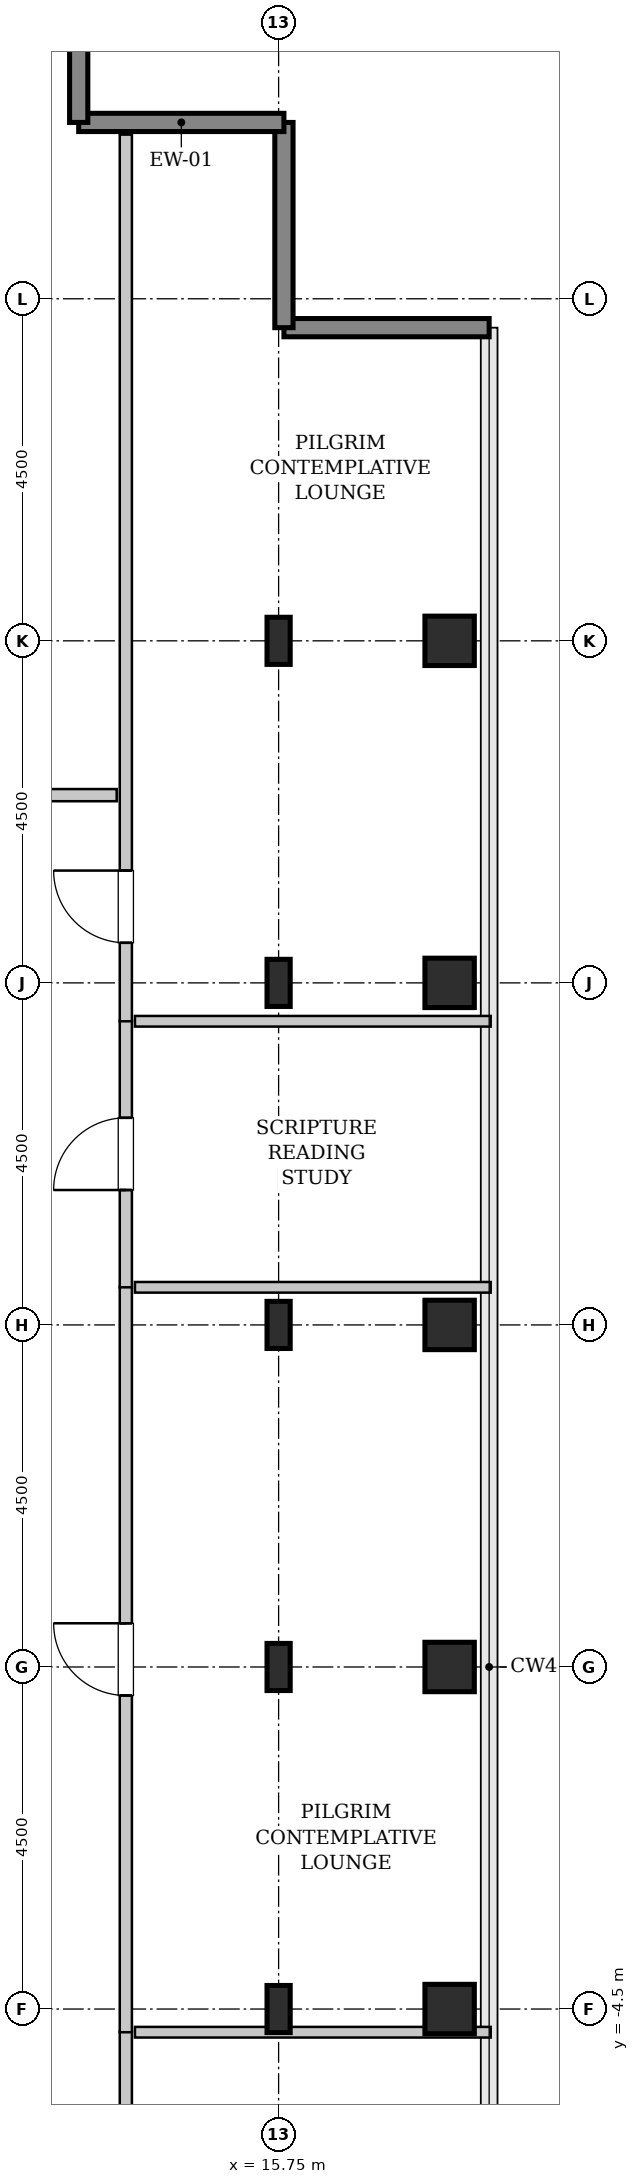
"""IFC4 building model, lengths in metres.
Left out: names, types, materials, properties, quantities, classifications, styles, units other than length and angle.
Written with IfcOpenShell. Run it as: python <this file> out.ifc"""

import sys

from ifc_helpers import new_model, si_unit, direction, frame, frame_2d, origin, origin_2d, place, context, subcontext, project, spatial, rectangle, hollow_rectangle, i_section, extrude, source, transform, mapped, element, fill, save


model = new_model("IFC4")
c1 = context("Model", 3, precision=1e-05, world=origin(), true_north=direction((0.0, 1.0)))
c2 = subcontext(c1, "Body", "Model", "MODEL_VIEW")
j1 = project(units=[si_unit("LENGTHUNIT", "METRE"), si_unit("PLANEANGLEUNIT", "RADIAN")], contexts=[c1])
p1 = place(None, origin())
s1 = spatial("IfcSite", under=j1, at=p1, CompositionType="ELEMENT")
p2 = place(p1, origin())
s2 = spatial("IfcBuilding", under=s1, at=p2, CompositionType="ELEMENT")
p3 = place(p2, frame((0.0, 0.0, 268.4)))
s3 = spatial("IfcBuildingStorey", under=s2, at=p3, CompositionType="ELEMENT", Elevation=268.4)
m1 = source(origin(), c2, "Body", "SweptSolid", [
    extrude(i_section(OverallWidth=0.305, OverallDepth=0.62, WebThickness=0.021, FlangeThickness=0.04, FilletRadius=0.027, at=origin_2d()), origin(), (0.0, 0.0, 1.0), 3.8),
])
for number, where, z_axis, x_axis in (
    (1, (15.75, -4.5, 0.0), (0.0, 0.0, 1.0), (1.0, 0.0, 0.0)),
    (2, (15.75, 0.0, 0.0), (0.0, 0.0, 1.0), (1.0, 0.0, 0.0)),
    (3, (15.75, 4.5, 0.0), (0.0, 0.0, 1.0), (1.0, 0.0, 0.0)),
    (4, (15.75, 9.0, 0.0), (0.0, 0.0, 1.0), (1.0, 0.0, 0.0)),
    (5, (15.75, 13.5, 0.0), (0.0, 0.0, 1.0), (1.0, 0.0, 0.0)),
):
    element("IfcColumn", number, at=place(p3, frame(where, z_axis=z_axis, x_axis=x_axis)), inside=s3, PredefinedType="COLUMN", context=c2, shape_type="MappedRepresentation", body=[
        mapped(m1, transform((0.0, 0.0, 0.0), x_axis=(1.0, 0.0, 0.0), y_axis=(0.0, 1.0, 0.0), z_axis=(0.0, 0.0, 1.0), scale=1.0)),
    ])
m2 = source(origin(), c2, "Body", "SweptSolid", [
    extrude(hollow_rectangle(XDim=0.65, YDim=0.65, WallThickness=0.032, InnerFilletRadius=0.032, OuterFilletRadius=0.064, at=origin_2d()), origin(), (0.0, 0.0, 1.0), 3.8),
])
for number, where, z_axis, x_axis in (
    (6, (18.0, -4.5, 0.0), (0.0, 0.0, 1.0), (1.0, 0.0, 0.0)),
    (7, (18.0, 0.0, 0.0), (0.0, 0.0, 1.0), (1.0, 0.0, 0.0)),
    (8, (18.0, 4.5, 0.0), (0.0, 0.0, 1.0), (1.0, 0.0, 0.0)),
    (9, (18.0, 9.0, 0.0), (0.0, 0.0, 1.0), (1.0, 0.0, 0.0)),
    (10, (18.0, 13.5, 0.0), (0.0, 0.0, 1.0), (1.0, 0.0, 0.0)),
):
    element("IfcColumn", number, at=place(p3, frame(where, z_axis=z_axis, x_axis=x_axis)), inside=s3, PredefinedType="COLUMN", context=c2, shape_type="MappedRepresentation", body=[
        mapped(m2, transform((0.0, 0.0, 0.0), x_axis=(1.0, 0.0, 0.0), y_axis=(0.0, 1.0, 0.0), z_axis=(0.0, 0.0, 1.0), scale=1.0)),
    ])
m3 = source(origin(), c2, "Body", "SweptSolid", [
    extrude(rectangle(XDim=2.7, YDim=0.24, at=frame_2d((1.35, 0.0))), origin(), (0.0, 0.0, 1.0), 3.55),
])
for number, where, z_axis, x_axis in (
    (11, (18.52, 17.62, 0.0), (0.0, 0.0, 1.0), (-1.0, 0.0, 0.0)),
    (12, (15.82, 17.62, 0.0), (0.0, 0.0, 1.0), (0.0, 1.0, 0.0)),
    (13, (15.82, 20.32, 0.0), (0.0, 0.0, 1.0), (-1.0, 0.0, 0.0)),
    (14, (13.12, 20.32, 0.0), (0.0, 0.0, 1.0), (0.0, 1.0, 0.0)),
):
    element("IfcWall", number, at=place(p3, frame(where, z_axis=z_axis, x_axis=x_axis)), inside=s3, PredefinedType="SHEAR", context=c2, shape_type="MappedRepresentation", body=[
        mapped(m3, transform((0.0, 0.0, 0.0), x_axis=(1.0, 0.0, 0.0), y_axis=(0.0, 1.0, 0.0), z_axis=(0.0, 0.0, 1.0), scale=1.0)),
    ])
m4 = source(origin(), c2, "Body", "SweptSolid", [
    extrude(rectangle(XDim=3.61, YDim=0.16, at=frame_2d((1.805, 0.0))), origin(), (0.0, 0.0, 1.0), 3.535),
])
p4 = place(p3, frame((13.74, -8.405, 0.0), z_axis=(0.0, 0.0, 1.0), x_axis=(0.0, 1.0, 0.0)))
e15 = element("IfcWall", 15, at=p4, inside=s3, PredefinedType="PARTITIONING", context=c2, shape_type="MappedRepresentation", body=[
    mapped(m4, transform((0.0, 0.0, 0.0), x_axis=(1.0, 0.0, 0.0), y_axis=(0.0, 1.0, 0.0), z_axis=(0.0, 0.0, 1.0), scale=1.0)),
])
p5 = place(p4, frame((1.33, 0.0, 0.0)))
e16 = element("IfcOpeningElement", 16, at=p5, cuts=e15, PredefinedType="OPENING", context=c2, shape_type="SweptSolid", body=[
    extrude(rectangle(XDim=0.95, YDim=2.1, at=frame_2d((0.475, 1.05))), frame((0.0, 0.09, 0.0), z_axis=(0.0, -1.0, 0.0), x_axis=(1.0, 0.0, 0.0)), (0.0, 0.0, 1.0), 0.18),
])
m5 = source(origin(), c2, "Body", "SweptSolid", [
    extrude(rectangle(XDim=4.68, YDim=0.14, at=frame_2d((2.34, 0.0))), origin(), (0.0, 0.0, 1.0), 2.925),
])
p6 = place(p3, frame((13.86, -4.805, 0.0), z_axis=(0.0, 0.0, 1.0), x_axis=(1.0, 0.0, 0.0)))
e17 = element("IfcWall", 17, at=p6, inside=s3, PredefinedType="PARTITIONING", context=c2, shape_type="MappedRepresentation", body=[
    mapped(m5, transform((0.0, 0.0, 0.0), x_axis=(1.0, 0.0, 0.0), y_axis=(0.0, 1.0, 0.0), z_axis=(0.0, 0.0, 1.0), scale=1.0)),
])
m6 = source(origin(), c2, "Body", "SweptSolid", [
    extrude(rectangle(XDim=9.81, YDim=0.16, at=frame_2d((4.905, 0.0))), origin(), (0.0, 0.0, 1.0), 3.535),
])
p7 = place(p3, frame((13.74, -4.805, 0.0), z_axis=(0.0, 0.0, 1.0), x_axis=(0.0, 1.0, 0.0)))
e18 = element("IfcWall", 18, at=p7, inside=s3, PredefinedType="PARTITIONING", context=c2, shape_type="MappedRepresentation", body=[
    mapped(m6, transform((0.0, 0.0, 0.0), x_axis=(1.0, 0.0, 0.0), y_axis=(0.0, 1.0, 0.0), z_axis=(0.0, 0.0, 1.0), scale=1.0)),
])
p8 = place(p7, frame((4.43, 0.0, 0.0)))
e19 = element("IfcOpeningElement", 19, at=p8, cuts=e18, PredefinedType="OPENING", context=c2, shape_type="SweptSolid", body=[
    extrude(rectangle(XDim=0.95, YDim=2.1, at=frame_2d((0.475, 1.05))), frame((0.0, 0.09, 0.0), z_axis=(0.0, -1.0, 0.0), x_axis=(1.0, 0.0, 0.0)), (0.0, 0.0, 1.0), 0.18),
])
p9 = place(p3, frame((13.86, 4.995, 0.0), z_axis=(0.0, 0.0, 1.0), x_axis=(1.0, 0.0, 0.0)))
e20 = element("IfcWall", 20, at=p9, inside=s3, PredefinedType="PARTITIONING", context=c2, shape_type="MappedRepresentation", body=[
    mapped(m5, transform((0.0, 0.0, 0.0), x_axis=(1.0, 0.0, 0.0), y_axis=(0.0, 1.0, 0.0), z_axis=(0.0, 0.0, 1.0), scale=1.0)),
])
m7 = source(origin(), c2, "Body", "SweptSolid", [
    extrude(rectangle(XDim=3.51, YDim=0.16, at=frame_2d((1.755, 0.0))), origin(), (0.0, 0.0, 1.0), 3.535),
])
p10 = place(p3, frame((13.74, 4.995, 0.0), z_axis=(0.0, 0.0, 1.0), x_axis=(0.0, 1.0, 0.0)))
e21 = element("IfcWall", 21, at=p10, inside=s3, PredefinedType="PARTITIONING", context=c2, shape_type="MappedRepresentation", body=[
    mapped(m7, transform((0.0, 0.0, 0.0), x_axis=(1.0, 0.0, 0.0), y_axis=(0.0, 1.0, 0.0), z_axis=(0.0, 0.0, 1.0), scale=1.0)),
])
p11 = place(p10, frame((1.28, 0.0, 0.0)))
e22 = element("IfcOpeningElement", 22, at=p11, cuts=e21, PredefinedType="OPENING", context=c2, shape_type="SweptSolid", body=[
    extrude(rectangle(XDim=0.95, YDim=2.1, at=frame_2d((0.475, 1.05))), frame((0.0, 0.09, 0.0), z_axis=(0.0, -1.0, 0.0), x_axis=(1.0, 0.0, 0.0)), (0.0, 0.0, 1.0), 0.18),
])
p12 = place(p3, frame((13.86, 8.495, 0.0), z_axis=(0.0, 0.0, 1.0), x_axis=(1.0, 0.0, 0.0)))
e23 = element("IfcWall", 23, at=p12, inside=s3, PredefinedType="PARTITIONING", context=c2, shape_type="MappedRepresentation", body=[
    mapped(m5, transform((0.0, 0.0, 0.0), x_axis=(1.0, 0.0, 0.0), y_axis=(0.0, 1.0, 0.0), z_axis=(0.0, 0.0, 1.0), scale=1.0)),
])
m8 = source(origin(), c2, "Body", "SweptSolid", [
    extrude(rectangle(XDim=11.665, YDim=0.16, at=frame_2d((5.833, 0.0))), origin(), (0.0, 0.0, 1.0), 3.535),
])
p13 = place(p3, frame((13.74, 8.495, 0.0), z_axis=(0.0, 0.0, 1.0), x_axis=(0.0, 1.0, 0.0)))
e24 = element("IfcWall", 24, at=p13, inside=s3, PredefinedType="PARTITIONING", context=c2, shape_type="MappedRepresentation", body=[
    mapped(m8, transform((0.0, 0.0, 0.0), x_axis=(1.0, 0.0, 0.0), y_axis=(0.0, 1.0, 0.0), z_axis=(0.0, 0.0, 1.0), scale=1.0)),
])
p14 = place(p13, frame((1.032, 0.0, 0.0)))
e25 = element("IfcOpeningElement", 25, at=p14, cuts=e24, PredefinedType="OPENING", context=c2, shape_type="SweptSolid", body=[
    extrude(rectangle(XDim=0.95, YDim=2.1, at=frame_2d((0.475, 1.05))), frame((0.0, 0.09, 0.0), z_axis=(0.0, -1.0, 0.0), x_axis=(1.0, 0.0, 0.0)), (0.0, 0.0, 1.0), 0.18),
])
m9 = source(origin(), c2, "Body", "SweptSolid", [
    extrude(rectangle(XDim=5.425, YDim=0.16, at=frame_2d((2.712, 0.0))), origin(), (0.0, 0.0, 1.0), 3.535),
])
p15 = place(p3, frame((8.195, 11.47, 0.0), z_axis=(0.0, 0.0, 1.0), x_axis=(1.0, 0.0, 0.0)))
e26 = element("IfcWall", 26, at=p15, inside=s3, PredefinedType="PARTITIONING", context=c2, shape_type="MappedRepresentation", body=[
    mapped(m9, transform((0.0, 0.0, 0.0), x_axis=(1.0, 0.0, 0.0), y_axis=(0.0, 1.0, 0.0), z_axis=(0.0, 0.0, 1.0), scale=1.0)),
])
p16 = place(p15, frame((2.238, 0.0, 0.0)))
e27 = element("IfcOpeningElement", 27, at=p16, cuts=e26, PredefinedType="OPENING", context=c2, shape_type="SweptSolid", body=[
    extrude(rectangle(XDim=0.95, YDim=2.1, at=frame_2d((0.475, 1.05))), frame((0.0, 0.09, 0.0), z_axis=(0.0, -1.0, 0.0), x_axis=(1.0, 0.0, 0.0)), (0.0, 0.0, 1.0), 0.18),
])
m10 = source(origin(), c2, "Body", "SweptSolid", [
    extrude(rectangle(XDim=0.95, YDim=2.1, at=frame_2d((0.475, 1.05))), frame((0.0, 0.025, 0.0), z_axis=(0.0, -1.0, 0.0), x_axis=(1.0, 0.0, 0.0)), (0.0, 0.0, 1.0), 0.05),
])
p17 = place(p8, origin())
e28 = element("IfcDoor", 28, at=p17, inside=s3, OperationType="SINGLE_SWING_RIGHT", PredefinedType="DOOR", context=c2, shape_type="MappedRepresentation", body=[
    mapped(m10, transform((0.0, 0.0, 0.0), x_axis=(1.0, 0.0, 0.0), y_axis=(0.0, 1.0, 0.0), z_axis=(0.0, 0.0, 1.0), scale=1.0)),
])
fill(e19, e28)
p18 = place(p11, origin())
e29 = element("IfcDoor", 29, at=p18, inside=s3, OperationType="SINGLE_SWING_LEFT", PredefinedType="DOOR", context=c2, shape_type="MappedRepresentation", body=[
    mapped(m10, transform((0.0, 0.0, 0.0), x_axis=(1.0, 0.0, 0.0), y_axis=(0.0, 1.0, 0.0), z_axis=(0.0, 0.0, 1.0), scale=1.0)),
])
fill(e22, e29)
p19 = place(p14, origin())
e30 = element("IfcDoor", 30, at=p19, inside=s3, OperationType="SINGLE_SWING_RIGHT", PredefinedType="DOOR", context=c2, shape_type="MappedRepresentation", body=[
    mapped(m10, transform((0.0, 0.0, 0.0), x_axis=(1.0, 0.0, 0.0), y_axis=(0.0, 1.0, 0.0), z_axis=(0.0, 0.0, 1.0), scale=1.0)),
])
fill(e25, e30)
save(model, sys.argv[1])
